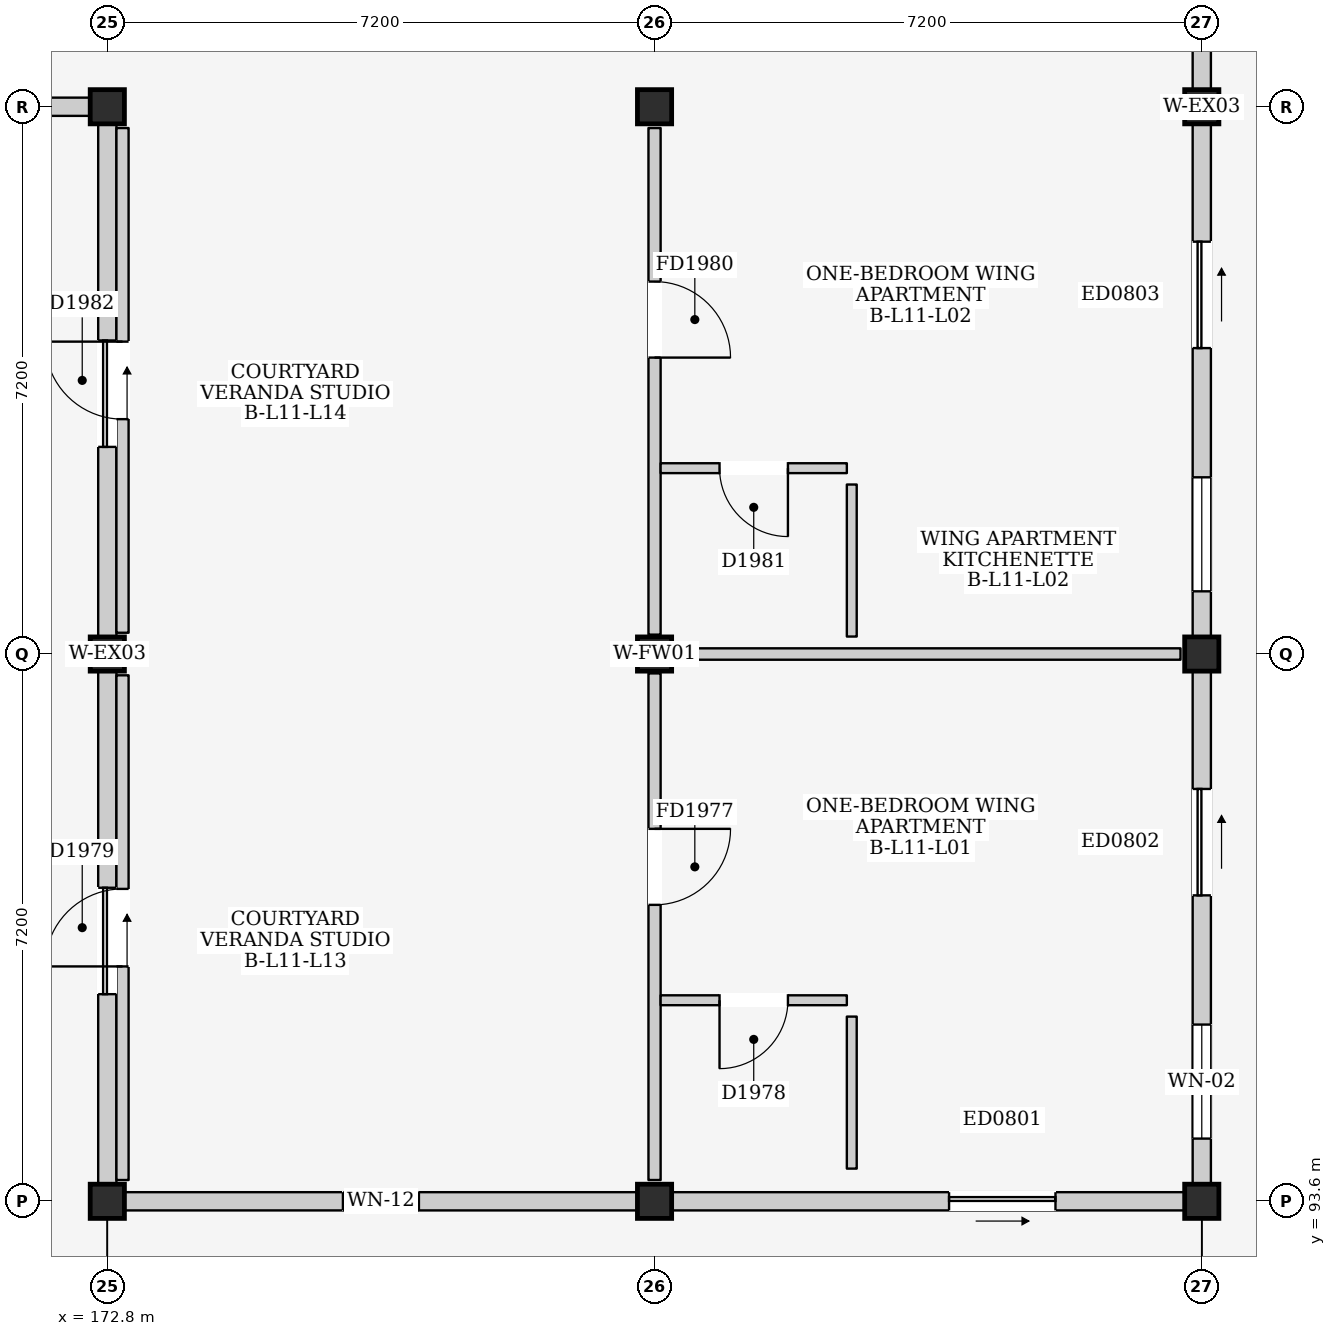
"""IFC4 building model, lengths in metres.
Left out: names, types, materials, properties, quantities, classifications, styles, units other than length and angle.
Written with IfcOpenShell. Run it as: python <this file> out.ifc"""

import sys

from ifc_helpers import new_model, si_unit, direction, frame, frame_2d, origin, origin_2d, place, context, subcontext, project, spatial, rectangle, extrude, element, fill, save


model = new_model("IFC4")
c1 = context("Model", 3, precision=1e-05, world=origin(), true_north=direction((0.0, 1.0)))
c2 = subcontext(c1, "Body", "Model", "MODEL_VIEW")
j1 = project(units=[si_unit("LENGTHUNIT", "METRE"), si_unit("PLANEANGLEUNIT", "RADIAN")], contexts=[c1])
p1 = place(None, origin())
s1 = spatial("IfcSite", under=j1, at=p1, CompositionType="ELEMENT")
p2 = place(p1, origin())
s2 = spatial("IfcBuilding", under=s1, at=p2, CompositionType="ELEMENT")
p3 = place(p2, frame((0.0, 0.0, 38.0)))
s3 = spatial("IfcBuildingStorey", under=s2, at=p3, CompositionType="ELEMENT", Elevation=38.0)
for number, where, z_axis, x_axis in (
    (1, (172.8, 93.6, 0.0), (0.0, 0.0, 1.0), (1.0, 0.0, 0.0)),
    (2, (172.8, 100.8, 0.0), (0.0, 0.0, 1.0), (1.0, 0.0, 0.0)),
    (3, (172.8, 108.0, 0.0), (0.0, 0.0, 1.0), (1.0, 0.0, 0.0)),
    (4, (180.0, 93.6, 0.0), (0.0, 0.0, 1.0), (1.0, 0.0, 0.0)),
    (5, (180.0, 100.8, 0.0), (0.0, 0.0, 1.0), (1.0, 0.0, 0.0)),
    (6, (180.0, 108.0, 0.0), (0.0, 0.0, 1.0), (1.0, 0.0, 0.0)),
    (7, (187.2, 93.6, 0.0), (0.0, 0.0, 1.0), (1.0, 0.0, 0.0)),
    (8, (187.2, 100.8, 0.0), (0.0, 0.0, 1.0), (1.0, 0.0, 0.0)),
    (9, (187.2, 108.0, 0.0), (0.0, 0.0, 1.0), (1.0, 0.0, 0.0)),
):
    element("IfcColumn", number, at=place(p3, frame(where, z_axis=z_axis, x_axis=x_axis)), inside=s3, PredefinedType="COLUMN", context=c2, shape_type="SweptSolid", body=[
        extrude(rectangle(XDim=0.45, YDim=0.45, at=origin_2d()), origin(), (0.0, 0.0, 1.0), 3.2),
    ])
p4 = place(p3, frame((165.825, 108.0, 0.0), z_axis=(0.0, 0.0, 1.0), x_axis=(1.0, 0.0, 0.0)))
e10 = element("IfcWall", 10, at=p4, inside=s3, PredefinedType="ELEMENTEDWALL", context=c2, shape_type="SweptSolid", body=[
    extrude(rectangle(XDim=6.75, YDim=0.24, at=frame_2d((3.375, 0.0))), origin(), (0.0, 0.0, 1.0), 2.375),
])
p5 = place(p4, frame((2.875, 0.0, 1.2)))
e11 = element("IfcOpeningElement", 11, at=p5, cuts=e10, PredefinedType="OPENING", context=c2, shape_type="SweptSolid", body=[
    extrude(rectangle(XDim=1.0, YDim=0.9, at=frame_2d((0.5, 0.45))), frame((0.0, 0.135, 0.0), z_axis=(0.0, -1.0, 0.0), x_axis=(1.0, 0.0, 0.0)), (0.0, 0.0, 1.0), 0.27),
])
p6 = place(p3, frame((173.025, 93.6, 0.0), z_axis=(0.0, 0.0, 1.0), x_axis=(1.0, 0.0, 0.0)))
e12 = element("IfcWall", 12, at=p6, inside=s3, PredefinedType="ELEMENTEDWALL", context=c2, shape_type="SweptSolid", body=[
    extrude(rectangle(XDim=6.75, YDim=0.24, at=frame_2d((3.375, 0.0))), origin(), (0.0, 0.0, 1.0), 2.375),
])
p7 = place(p6, frame((2.875, 0.0, 1.1)))
e13 = element("IfcOpeningElement", 13, at=p7, cuts=e12, PredefinedType="OPENING", context=c2, shape_type="SweptSolid", body=[
    extrude(rectangle(XDim=1.0, YDim=0.9, at=frame_2d((0.5, 0.45))), frame((0.0, 0.135, 0.0), z_axis=(0.0, -1.0, 0.0), x_axis=(1.0, 0.0, 0.0)), (0.0, 0.0, 1.0), 0.27),
])
p8 = place(p3, frame((172.8, 93.825, 0.0), z_axis=(0.0, 0.0, 1.0), x_axis=(0.0, 1.0, 0.0)))
e14 = element("IfcWall", 14, at=p8, inside=s3, PredefinedType="ELEMENTEDWALL", context=c2, shape_type="SweptSolid", body=[
    extrude(rectangle(XDim=6.75, YDim=0.24, at=frame_2d((3.375, 0.0))), origin(), (0.0, 0.0, 1.0), 2.475),
])
p9 = place(p8, frame((2.5, 0.0, 0.0)))
e15 = element("IfcOpeningElement", 15, at=p9, cuts=e14, PredefinedType="OPENING", context=c2, shape_type="SweptSolid", body=[
    extrude(rectangle(XDim=1.4, YDim=2.1, at=frame_2d((0.7, 1.05))), frame((0.0, 0.135, 0.0), z_axis=(0.0, -1.0, 0.0), x_axis=(1.0, 0.0, 0.0)), (0.0, 0.0, 1.0), 0.27),
])
p10 = place(p3, frame((172.8, 101.025, 0.0), z_axis=(0.0, 0.0, 1.0), x_axis=(0.0, 1.0, 0.0)))
e16 = element("IfcWall", 16, at=p10, inside=s3, PredefinedType="ELEMENTEDWALL", context=c2, shape_type="SweptSolid", body=[
    extrude(rectangle(XDim=6.75, YDim=0.24, at=frame_2d((3.375, 0.0))), origin(), (0.0, 0.0, 1.0), 2.475),
])
p11 = place(p10, frame((2.5, 0.0, 0.0)))
e17 = element("IfcOpeningElement", 17, at=p11, cuts=e16, PredefinedType="OPENING", context=c2, shape_type="SweptSolid", body=[
    extrude(rectangle(XDim=1.4, YDim=2.1, at=frame_2d((0.7, 1.05))), frame((0.0, 0.135, 0.0), z_axis=(0.0, -1.0, 0.0), x_axis=(1.0, 0.0, 0.0)), (0.0, 0.0, 1.0), 0.27),
])
p12 = place(p3, frame((180.225, 93.6, 0.0), z_axis=(0.0, 0.0, 1.0), x_axis=(1.0, 0.0, 0.0)))
e18 = element("IfcWall", 18, at=p12, inside=s3, PredefinedType="ELEMENTEDWALL", context=c2, shape_type="SweptSolid", body=[
    extrude(rectangle(XDim=6.75, YDim=0.24, at=frame_2d((3.375, 0.0))), origin(), (0.0, 0.0, 1.0), 2.375),
])
p13 = place(p12, frame((3.65, 0.0, 0.0)))
e19 = element("IfcOpeningElement", 19, at=p13, cuts=e18, PredefinedType="OPENING", context=c2, shape_type="SweptSolid", body=[
    extrude(rectangle(XDim=1.4, YDim=2.1, at=frame_2d((0.7, 1.05))), frame((0.0, 0.135, 0.0), z_axis=(0.0, -1.0, 0.0), x_axis=(1.0, 0.0, 0.0)), (0.0, 0.0, 1.0), 0.27),
])
p14 = place(p3, frame((187.2, 93.825, 0.0), z_axis=(0.0, 0.0, 1.0), x_axis=(0.0, 1.0, 0.0)))
e20 = element("IfcWall", 20, at=p14, inside=s3, PredefinedType="ELEMENTEDWALL", context=c2, shape_type="SweptSolid", body=[
    extrude(rectangle(XDim=6.75, YDim=0.24, at=frame_2d((3.375, 0.0))), origin(), (0.0, 0.0, 1.0), 2.525),
])
p15 = place(p14, frame((3.8, 0.0, 0.0)))
e21 = element("IfcOpeningElement", 21, at=p15, cuts=e20, PredefinedType="OPENING", context=c2, shape_type="SweptSolid", body=[
    extrude(rectangle(XDim=1.4, YDim=2.1, at=frame_2d((0.7, 1.05))), frame((0.0, 0.135, 0.0), z_axis=(0.0, -1.0, 0.0), x_axis=(1.0, 0.0, 0.0)), (0.0, 0.0, 1.0), 0.27),
])
p16 = place(p14, frame((0.6, 0.0, 0.915)))
e22 = element("IfcOpeningElement", 22, at=p16, cuts=e20, PredefinedType="OPENING", context=c2, shape_type="SweptSolid", body=[
    extrude(rectangle(XDim=1.5, YDim=1.5, at=frame_2d((0.75, 0.75))), frame((0.0, 0.135, 0.0), z_axis=(0.0, -1.0, 0.0), x_axis=(1.0, 0.0, 0.0)), (0.0, 0.0, 1.0), 0.27),
])
p17 = place(p3, frame((187.2, 101.025, 0.0), z_axis=(0.0, 0.0, 1.0), x_axis=(0.0, 1.0, 0.0)))
e23 = element("IfcWall", 23, at=p17, inside=s3, PredefinedType="ELEMENTEDWALL", context=c2, shape_type="SweptSolid", body=[
    extrude(rectangle(XDim=6.75, YDim=0.24, at=frame_2d((3.375, 0.0))), origin(), (0.0, 0.0, 1.0), 2.525),
])
p18 = place(p17, frame((3.8, 0.0, 0.0)))
e24 = element("IfcOpeningElement", 24, at=p18, cuts=e23, PredefinedType="OPENING", context=c2, shape_type="SweptSolid", body=[
    extrude(rectangle(XDim=1.4, YDim=2.1, at=frame_2d((0.7, 1.05))), frame((0.0, 0.135, 0.0), z_axis=(0.0, -1.0, 0.0), x_axis=(1.0, 0.0, 0.0)), (0.0, 0.0, 1.0), 0.27),
])
p19 = place(p17, frame((0.6, 0.0, 0.915)))
e25 = element("IfcOpeningElement", 25, at=p19, cuts=e23, PredefinedType="OPENING", context=c2, shape_type="SweptSolid", body=[
    extrude(rectangle(XDim=1.5, YDim=1.5, at=frame_2d((0.75, 0.75))), frame((0.0, 0.135, 0.0), z_axis=(0.0, -1.0, 0.0), x_axis=(1.0, 0.0, 0.0)), (0.0, 0.0, 1.0), 0.27),
])
p20 = place(p3, frame((187.2, 108.225, 0.0), z_axis=(0.0, 0.0, 1.0), x_axis=(0.0, 1.0, 0.0)))
e26 = element("IfcWall", 26, at=p20, inside=s3, PredefinedType="ELEMENTEDWALL", context=c2, shape_type="SweptSolid", body=[
    extrude(rectangle(XDim=6.75, YDim=0.24, at=frame_2d((3.375, 0.0))), origin(), (0.0, 0.0, 1.0), 2.525),
])
p21 = place(p20, frame((3.65, 0.0, 0.0)))
e27 = element("IfcOpeningElement", 27, at=p21, cuts=e26, PredefinedType="OPENING", context=c2, shape_type="SweptSolid", body=[
    extrude(rectangle(XDim=1.4, YDim=2.1, at=frame_2d((0.7, 1.05))), frame((0.0, 0.135, 0.0), z_axis=(0.0, -1.0, 0.0), x_axis=(1.0, 0.0, 0.0)), (0.0, 0.0, 1.0), 0.27),
])
p22 = place(p3, frame((180.0, 93.88, 0.0), z_axis=(0.0, 0.0, 1.0), x_axis=(0.0, 1.0, 0.0)))
e28 = element("IfcWall", 28, at=p22, inside=s3, PredefinedType="PARTITIONING", context=c2, shape_type="SweptSolid", body=[
    extrude(rectangle(XDim=6.665, YDim=0.16, at=frame_2d((3.333, 0.0))), origin(), (0.0, 0.0, 1.0), 2.475),
])
p23 = place(p22, frame((3.62, 0.0, 0.0)))
e29 = element("IfcOpeningElement", 29, at=p23, cuts=e28, PredefinedType="OPENING", context=c2, shape_type="SweptSolid", body=[
    extrude(rectangle(XDim=1.0, YDim=2.15, at=frame_2d((0.5, 1.075))), frame((0.0, 0.095, 0.0), z_axis=(0.0, -1.0, 0.0), x_axis=(1.0, 0.0, 0.0)), (0.0, 0.0, 1.0), 0.19),
])
p24 = place(p3, frame((180.28, 100.8, 0.0), z_axis=(0.0, 0.0, 1.0), x_axis=(1.0, 0.0, 0.0)))
e30 = element("IfcWall", 30, at=p24, inside=s3, PredefinedType="PARTITIONING", context=c2, shape_type="SweptSolid", body=[
    extrude(rectangle(XDim=6.64, YDim=0.15, at=frame_2d((3.32, 0.0))), origin(), (0.0, 0.0, 1.0), 2.375),
])
p25 = place(p3, frame((180.08, 96.245, 0.0), z_axis=(0.0, 0.0, 1.0), x_axis=(1.0, 0.0, 0.0)))
e31 = element("IfcWall", 31, at=p25, inside=s3, PredefinedType="PARTITIONING", context=c2, shape_type="SweptSolid", body=[
    extrude(rectangle(XDim=2.45, YDim=0.13, at=frame_2d((1.225, 0.0))), origin(), (0.0, 0.0, 1.0), 2.99),
])
p26 = place(p25, frame((0.775, 0.0, 0.0)))
e32 = element("IfcOpeningElement", 32, at=p26, cuts=e31, PredefinedType="OPENING", context=c2, shape_type="SweptSolid", body=[
    extrude(rectangle(XDim=0.9, YDim=2.1, at=frame_2d((0.45, 1.05))), frame((0.0, 0.08, 0.0), z_axis=(0.0, -1.0, 0.0), x_axis=(1.0, 0.0, 0.0)), (0.0, 0.0, 1.0), 0.16),
])
p27 = place(p3, frame((182.595, 94.03, 0.0), z_axis=(0.0, 0.0, 1.0), x_axis=(0.0, 1.0, 0.0)))
e33 = element("IfcWall", 33, at=p27, inside=s3, PredefinedType="PARTITIONING", context=c2, shape_type="SweptSolid", body=[
    extrude(rectangle(XDim=2.0, YDim=0.13, at=frame_2d((1.0, 0.0))), origin(), (0.0, 0.0, 1.0), 2.99),
])
p28 = place(p3, frame((173.0, 93.88, 0.0), z_axis=(0.0, 0.0, 1.0), x_axis=(0.0, 1.0, 0.0)))
e34 = element("IfcWall", 34, at=p28, inside=s3, PredefinedType="PARTITIONING", context=c2, shape_type="SweptSolid", body=[
    extrude(rectangle(XDim=6.64, YDim=0.16, at=frame_2d((3.32, 0.0))), origin(), (0.0, 0.0, 1.0), 2.99),
])
p29 = place(p28, frame((2.81, 0.0, 0.0)))
e35 = element("IfcOpeningElement", 35, at=p29, cuts=e34, PredefinedType="OPENING", context=c2, shape_type="SweptSolid", body=[
    extrude(rectangle(XDim=1.02, YDim=2.18, at=frame_2d((0.51, 1.09))), frame((0.0, 0.095, 0.0), z_axis=(0.0, -1.0, 0.0), x_axis=(1.0, 0.0, 0.0)), (0.0, 0.0, 1.0), 0.19),
])
p30 = place(p3, frame((180.0, 101.055, 0.0), z_axis=(0.0, 0.0, 1.0), x_axis=(0.0, 1.0, 0.0)))
e36 = element("IfcWall", 36, at=p30, inside=s3, PredefinedType="PARTITIONING", context=c2, shape_type="SweptSolid", body=[
    extrude(rectangle(XDim=6.665, YDim=0.16, at=frame_2d((3.333, 0.0))), origin(), (0.0, 0.0, 1.0), 2.475),
])
p31 = place(p30, frame((3.645, 0.0, 0.0)))
e37 = element("IfcOpeningElement", 37, at=p31, cuts=e36, PredefinedType="OPENING", context=c2, shape_type="SweptSolid", body=[
    extrude(rectangle(XDim=1.0, YDim=2.15, at=frame_2d((0.5, 1.075))), frame((0.0, 0.095, 0.0), z_axis=(0.0, -1.0, 0.0), x_axis=(1.0, 0.0, 0.0)), (0.0, 0.0, 1.0), 0.19),
])
p32 = place(p3, frame((180.08, 103.245, 0.0), z_axis=(0.0, 0.0, 1.0), x_axis=(1.0, 0.0, 0.0)))
e38 = element("IfcWall", 38, at=p32, inside=s3, PredefinedType="PARTITIONING", context=c2, shape_type="SweptSolid", body=[
    extrude(rectangle(XDim=2.45, YDim=0.13, at=frame_2d((1.225, 0.0))), origin(), (0.0, 0.0, 1.0), 2.99),
])
p33 = place(p32, frame((0.775, 0.0, 0.0)))
e39 = element("IfcOpeningElement", 39, at=p33, cuts=e38, PredefinedType="OPENING", context=c2, shape_type="SweptSolid", body=[
    extrude(rectangle(XDim=0.9, YDim=2.1, at=frame_2d((0.45, 1.05))), frame((0.0, 0.08, 0.0), z_axis=(0.0, -1.0, 0.0), x_axis=(1.0, 0.0, 0.0)), (0.0, 0.0, 1.0), 0.16),
])
p34 = place(p3, frame((182.595, 101.03, 0.0), z_axis=(0.0, 0.0, 1.0), x_axis=(0.0, 1.0, 0.0)))
e40 = element("IfcWall", 40, at=p34, inside=s3, PredefinedType="PARTITIONING", context=c2, shape_type="SweptSolid", body=[
    extrude(rectangle(XDim=2.0, YDim=0.13, at=frame_2d((1.0, 0.0))), origin(), (0.0, 0.0, 1.0), 2.99),
])
p35 = place(p3, frame((173.0, 101.08, 0.0), z_axis=(0.0, 0.0, 1.0), x_axis=(0.0, 1.0, 0.0)))
e41 = element("IfcWall", 41, at=p35, inside=s3, PredefinedType="PARTITIONING", context=c2, shape_type="SweptSolid", body=[
    extrude(rectangle(XDim=6.64, YDim=0.16, at=frame_2d((3.32, 0.0))), origin(), (0.0, 0.0, 1.0), 2.99),
])
p36 = place(p35, frame((2.81, 0.0, 0.0)))
e42 = element("IfcOpeningElement", 42, at=p36, cuts=e41, PredefinedType="OPENING", context=c2, shape_type="SweptSolid", body=[
    extrude(rectangle(XDim=1.02, YDim=2.18, at=frame_2d((0.51, 1.09))), frame((0.0, 0.095, 0.0), z_axis=(0.0, -1.0, 0.0), x_axis=(1.0, 0.0, 0.0)), (0.0, 0.0, 1.0), 0.19),
])
p37 = place(p7, origin())
e43 = element("IfcWindow", 43, at=p37, inside=s3, PartitioningType="SINGLE_PANEL", PredefinedType="WINDOW", context=c2, shape_type="SweptSolid", body=[
    extrude(rectangle(XDim=1.0, YDim=0.9, at=frame_2d((0.5, 0.45))), frame((0.0, 0.03, 0.0), z_axis=(0.0, -1.0, 0.0), x_axis=(1.0, 0.0, 0.0)), (0.0, 0.0, 1.0), 0.06),
])
fill(e13, e43)
p38 = place(p9, frame((1.4, 0.0, 0.0), z_axis=(0.0, 0.0, 1.0), x_axis=(-1.0, 0.0, 0.0)))
e44 = element("IfcDoor", 44, at=p38, inside=s3, OperationType="SLIDING_TO_RIGHT", PredefinedType="DOOR", context=c2, shape_type="SweptSolid", body=[
    extrude(rectangle(XDim=1.4, YDim=2.1, at=frame_2d((0.7, 1.05))), frame((0.0, 0.025, 0.0), z_axis=(0.0, -1.0, 0.0), x_axis=(1.0, 0.0, 0.0)), (0.0, 0.0, 1.0), 0.05),
])
fill(e15, e44)
p39 = place(p11, frame((1.4, 0.0, 0.0), z_axis=(0.0, 0.0, 1.0), x_axis=(-1.0, 0.0, 0.0)))
e45 = element("IfcDoor", 45, at=p39, inside=s3, OperationType="SLIDING_TO_RIGHT", PredefinedType="DOOR", context=c2, shape_type="SweptSolid", body=[
    extrude(rectangle(XDim=1.4, YDim=2.1, at=frame_2d((0.7, 1.05))), frame((0.0, 0.025, 0.0), z_axis=(0.0, -1.0, 0.0), x_axis=(1.0, 0.0, 0.0)), (0.0, 0.0, 1.0), 0.05),
])
fill(e17, e45)
p40 = place(p13, frame((1.4, 0.0, 0.0), z_axis=(0.0, 0.0, 1.0), x_axis=(-1.0, 0.0, 0.0)))
e46 = element("IfcDoor", 46, at=p40, inside=s3, OperationType="SLIDING_TO_RIGHT", PredefinedType="DOOR", context=c2, shape_type="SweptSolid", body=[
    extrude(rectangle(XDim=1.4, YDim=2.1, at=frame_2d((0.7, 1.05))), frame((0.0, 0.025, 0.0), z_axis=(0.0, -1.0, 0.0), x_axis=(1.0, 0.0, 0.0)), (0.0, 0.0, 1.0), 0.05),
])
fill(e19, e46)
p41 = place(p15, frame((1.4, 0.0, 0.0), z_axis=(0.0, 0.0, 1.0), x_axis=(-1.0, 0.0, 0.0)))
e47 = element("IfcDoor", 47, at=p41, inside=s3, OperationType="SLIDING_TO_RIGHT", PredefinedType="DOOR", context=c2, shape_type="SweptSolid", body=[
    extrude(rectangle(XDim=1.4, YDim=2.1, at=frame_2d((0.7, 1.05))), frame((0.0, 0.025, 0.0), z_axis=(0.0, -1.0, 0.0), x_axis=(1.0, 0.0, 0.0)), (0.0, 0.0, 1.0), 0.05),
])
fill(e21, e47)
p42 = place(p16, origin())
e48 = element("IfcWindow", 48, at=p42, inside=s3, PartitioningType="DOUBLE_PANEL_VERTICAL", PredefinedType="WINDOW", context=c2, shape_type="SweptSolid", body=[
    extrude(rectangle(XDim=1.5, YDim=1.5, at=frame_2d((0.75, 0.75))), frame((0.0, 0.03, 0.0), z_axis=(0.0, -1.0, 0.0), x_axis=(1.0, 0.0, 0.0)), (0.0, 0.0, 1.0), 0.06),
])
fill(e22, e48)
p43 = place(p18, frame((1.4, 0.0, 0.0), z_axis=(0.0, 0.0, 1.0), x_axis=(-1.0, 0.0, 0.0)))
e49 = element("IfcDoor", 49, at=p43, inside=s3, OperationType="SLIDING_TO_RIGHT", PredefinedType="DOOR", context=c2, shape_type="SweptSolid", body=[
    extrude(rectangle(XDim=1.4, YDim=2.1, at=frame_2d((0.7, 1.05))), frame((0.0, 0.025, 0.0), z_axis=(0.0, -1.0, 0.0), x_axis=(1.0, 0.0, 0.0)), (0.0, 0.0, 1.0), 0.05),
])
fill(e24, e49)
p44 = place(p19, origin())
e50 = element("IfcWindow", 50, at=p44, inside=s3, PartitioningType="DOUBLE_PANEL_VERTICAL", PredefinedType="WINDOW", context=c2, shape_type="SweptSolid", body=[
    extrude(rectangle(XDim=1.5, YDim=1.5, at=frame_2d((0.75, 0.75))), frame((0.0, 0.03, 0.0), z_axis=(0.0, -1.0, 0.0), x_axis=(1.0, 0.0, 0.0)), (0.0, 0.0, 1.0), 0.06),
])
fill(e25, e50)
p45 = place(p23, frame((1.0, 0.0, 0.0), z_axis=(0.0, 0.0, 1.0), x_axis=(-1.0, 0.0, 0.0)))
e51 = element("IfcDoor", 51, at=p45, inside=s3, OperationType="SINGLE_SWING_LEFT", PredefinedType="DOOR", context=c2, shape_type="SweptSolid", body=[
    extrude(rectangle(XDim=1.0, YDim=2.15, at=frame_2d((0.5, 1.075))), frame((0.0, 0.025, 0.0), z_axis=(0.0, -1.0, 0.0), x_axis=(1.0, 0.0, 0.0)), (0.0, 0.0, 1.0), 0.05),
])
fill(e29, e51)
p46 = place(p26, frame((0.9, 0.0, 0.0), z_axis=(0.0, 0.0, 1.0), x_axis=(-1.0, 0.0, 0.0)))
e52 = element("IfcDoor", 52, at=p46, inside=s3, OperationType="SINGLE_SWING_RIGHT", PredefinedType="DOOR", context=c2, shape_type="SweptSolid", body=[
    extrude(rectangle(XDim=0.9, YDim=2.1, at=frame_2d((0.45, 1.05))), frame((0.0, 0.025, 0.0), z_axis=(0.0, -1.0, 0.0), x_axis=(1.0, 0.0, 0.0)), (0.0, 0.0, 1.0), 0.05),
])
fill(e32, e52)
p47 = place(p29, origin())
e53 = element("IfcDoor", 53, at=p47, inside=s3, OperationType="SINGLE_SWING_LEFT", PredefinedType="DOOR", context=c2, shape_type="SweptSolid", body=[
    extrude(rectangle(XDim=1.02, YDim=2.18, at=frame_2d((0.51, 1.09))), frame((0.0, 0.025, 0.0), z_axis=(0.0, -1.0, 0.0), x_axis=(1.0, 0.0, 0.0)), (0.0, 0.0, 1.0), 0.05),
])
fill(e35, e53)
p48 = place(p31, frame((1.0, 0.0, 0.0), z_axis=(0.0, 0.0, 1.0), x_axis=(-1.0, 0.0, 0.0)))
e54 = element("IfcDoor", 54, at=p48, inside=s3, OperationType="SINGLE_SWING_RIGHT", PredefinedType="DOOR", context=c2, shape_type="SweptSolid", body=[
    extrude(rectangle(XDim=1.0, YDim=2.15, at=frame_2d((0.5, 1.075))), frame((0.0, 0.025, 0.0), z_axis=(0.0, -1.0, 0.0), x_axis=(1.0, 0.0, 0.0)), (0.0, 0.0, 1.0), 0.05),
])
fill(e37, e54)
p49 = place(p33, frame((0.9, 0.0, 0.0), z_axis=(0.0, 0.0, 1.0), x_axis=(-1.0, 0.0, 0.0)))
e55 = element("IfcDoor", 55, at=p49, inside=s3, OperationType="SINGLE_SWING_LEFT", PredefinedType="DOOR", context=c2, shape_type="SweptSolid", body=[
    extrude(rectangle(XDim=0.9, YDim=2.1, at=frame_2d((0.45, 1.05))), frame((0.0, 0.025, 0.0), z_axis=(0.0, -1.0, 0.0), x_axis=(1.0, 0.0, 0.0)), (0.0, 0.0, 1.0), 0.05),
])
fill(e39, e55)
p50 = place(p36, origin())
e56 = element("IfcDoor", 56, at=p50, inside=s3, OperationType="SINGLE_SWING_RIGHT", PredefinedType="DOOR", context=c2, shape_type="SweptSolid", body=[
    extrude(rectangle(XDim=1.02, YDim=2.18, at=frame_2d((0.51, 1.09))), frame((0.0, 0.025, 0.0), z_axis=(0.0, -1.0, 0.0), x_axis=(1.0, 0.0, 0.0)), (0.0, 0.0, 1.0), 0.05),
])
fill(e42, e56)
save(model, sys.argv[1])
